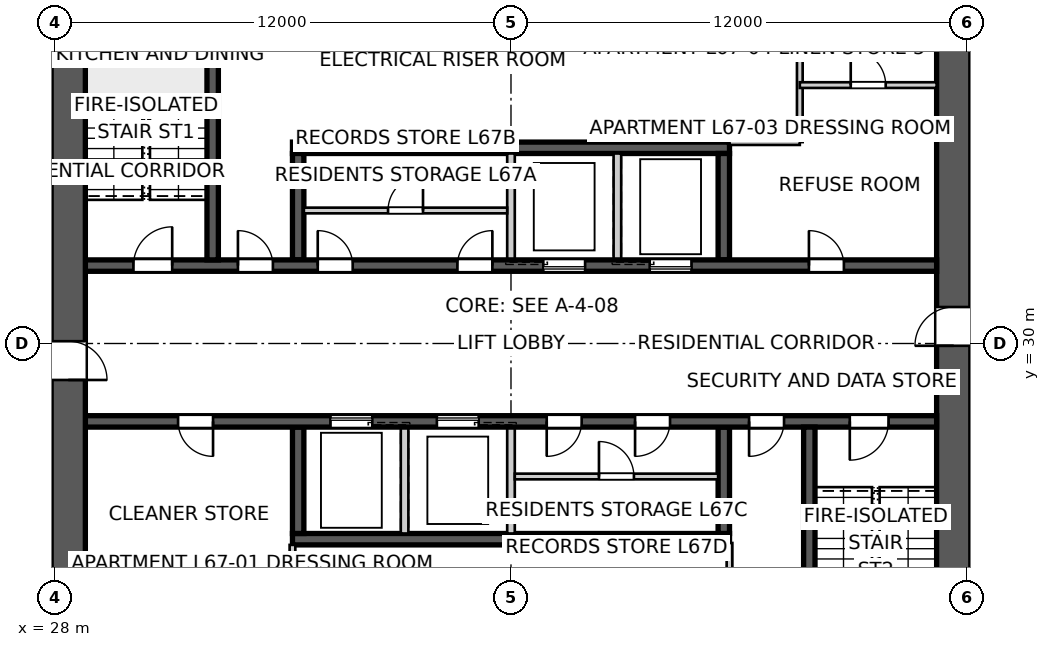
"""IFC4 building model, lengths in metres.
Left out: names, types, materials, properties, quantities, classifications, styles, units other than length and angle.
Written with IfcOpenShell. Run it as: python <this file> out.ifc"""

import sys

from ifc_helpers import new_model, si_unit, direction, frame, frame_2d, origin, place, context, subcontext, project, spatial, polyline, rectangle, outline, extrude, element, fill, save


model = new_model("IFC4")
c1 = context("Model", 3, precision=1e-05, world=origin(), true_north=direction((0.0, 1.0)))
c2 = subcontext(c1, "Body", "Model", "MODEL_VIEW")
j1 = project(units=[si_unit("LENGTHUNIT", "METRE"), si_unit("PLANEANGLEUNIT", "RADIAN")], contexts=[c1])
p1 = place(None, origin())
s1 = spatial("IfcSite", under=j1, at=p1, CompositionType="ELEMENT")
p2 = place(p1, origin())
s2 = spatial("IfcBuilding", under=s1, at=p2, CompositionType="ELEMENT")
p3 = place(p2, frame((0.0, 0.0, 243.8)))
s3 = spatial("IfcBuildingStorey", under=s2, at=p3, CompositionType="ELEMENT", Elevation=243.8)
p4 = place(p3, frame((51.65, 18.8, 0.0), z_axis=(0.0, 0.0, 1.0), x_axis=(0.0, 1.0, 0.0)))
e1 = element("IfcWall", 1, at=p4, inside=s3, PredefinedType="SHEAR", context=c2, shape_type="SweptSolid", body=[
    extrude(outline(polyline([(0.0, -0.45), (22.4, -0.45), (22.4, -0.025), (22.85, -0.025), (22.85, 0.025), (22.4, 0.025), (22.4, 0.45), (0.0, 0.45), (0.0, 0.025), (-0.45, 0.025), (-0.45, -0.025), (0.0, -0.025), (0.0, -0.45)])), origin(), (0.0, 0.0, 1.0), 3.4),
])
p5 = place(p4, frame((11.14, 0.0, 0.0)))
e2 = element("IfcOpeningElement", 2, at=p5, cuts=e1, PredefinedType="OPENING", context=c2, shape_type="SweptSolid", body=[
    extrude(rectangle(XDim=1.02, YDim=2.4, at=frame_2d((0.51, 1.2))), frame((0.0, 0.46, 0.0), z_axis=(0.0, -1.0, 0.0), x_axis=(1.0, 0.0, 0.0)), (0.0, 0.0, 1.0), 0.92),
])
p6 = place(p3, frame((28.35, 41.2, 0.0), z_axis=(0.0, 0.0, 1.0), x_axis=(0.0, -1.0, 0.0)))
e3 = element("IfcWall", 3, at=p6, inside=s3, PredefinedType="SHEAR", context=c2, shape_type="SweptSolid", body=[
    extrude(outline(polyline([(0.0, -0.45), (22.4, -0.45), (22.4, -0.025), (22.85, -0.025), (22.85, 0.025), (22.4, 0.025), (22.4, 0.45), (0.0, 0.45), (0.0, 0.025), (-0.45, 0.025), (-0.45, -0.025), (0.0, -0.025), (0.0, -0.45)])), origin(), (0.0, 0.0, 1.0), 3.4),
])
p7 = place(p6, frame((11.14, 0.0, 0.0)))
e4 = element("IfcOpeningElement", 4, at=p7, cuts=e3, PredefinedType="OPENING", context=c2, shape_type="SweptSolid", body=[
    extrude(rectangle(XDim=1.02, YDim=2.4, at=frame_2d((0.51, 1.2))), frame((0.0, 0.46, 0.0), z_axis=(0.0, -1.0, 0.0), x_axis=(1.0, 0.0, 0.0)), (0.0, 0.0, 1.0), 0.92),
])
p8 = place(p3, frame((28.8, 32.05, 0.0), z_axis=(0.0, 0.0, 1.0), x_axis=(1.0, 0.0, 0.0)))
e5 = element("IfcWall", 5, at=p8, inside=s3, PredefinedType="SHEAR", context=c2, shape_type="SweptSolid", body=[
    extrude(rectangle(XDim=22.4, YDim=0.3, at=frame_2d((11.2, 0.0))), origin(), (0.0, 0.0, 1.0), 3.4),
])
p9 = place(p8, frame((19.04, 0.0, 0.0)))
e6 = element("IfcOpeningElement", 6, at=p9, cuts=e5, PredefinedType="OPENING", context=c2, shape_type="SweptSolid", body=[
    extrude(rectangle(XDim=0.92, YDim=2.1, at=frame_2d((0.46, 1.05))), frame((0.0, 0.16, 0.0), z_axis=(0.0, -1.0, 0.0), x_axis=(1.0, 0.0, 0.0)), (0.0, 0.0, 1.0), 0.32),
])
p10 = place(p8, frame((1.265, 0.0, 0.0)))
e7 = element("IfcOpeningElement", 7, at=p10, cuts=e5, PredefinedType="OPENING", context=c2, shape_type="SweptSolid", body=[
    extrude(rectangle(XDim=1.02, YDim=2.1, at=frame_2d((0.51, 1.05))), frame((0.0, 0.16, 0.0), z_axis=(0.0, -1.0, 0.0), x_axis=(1.0, 0.0, 0.0)), (0.0, 0.0, 1.0), 0.32),
])
p11 = place(p8, frame((4.015, 0.0, 0.0)))
e8 = element("IfcOpeningElement", 8, at=p11, cuts=e5, PredefinedType="OPENING", context=c2, shape_type="SweptSolid", body=[
    extrude(rectangle(XDim=0.92, YDim=2.1, at=frame_2d((0.46, 1.05))), frame((0.0, 0.16, 0.0), z_axis=(0.0, -1.0, 0.0), x_axis=(1.0, 0.0, 0.0)), (0.0, 0.0, 1.0), 0.32),
])
p12 = place(p8, frame((6.115, 0.0, 0.0)))
e9 = element("IfcOpeningElement", 9, at=p12, cuts=e5, PredefinedType="OPENING", context=c2, shape_type="SweptSolid", body=[
    extrude(rectangle(XDim=0.92, YDim=2.1, at=frame_2d((0.46, 1.05))), frame((0.0, 0.16, 0.0), z_axis=(0.0, -1.0, 0.0), x_axis=(1.0, 0.0, 0.0)), (0.0, 0.0, 1.0), 0.32),
])
p13 = place(p8, frame((9.79, 0.0, 0.0)))
e10 = element("IfcOpeningElement", 10, at=p13, cuts=e5, PredefinedType="OPENING", context=c2, shape_type="SweptSolid", body=[
    extrude(rectangle(XDim=0.92, YDim=2.1, at=frame_2d((0.46, 1.05))), frame((0.0, 0.16, 0.0), z_axis=(0.0, -1.0, 0.0), x_axis=(1.0, 0.0, 0.0)), (0.0, 0.0, 1.0), 0.32),
])
p14 = place(p8, frame((12.05, 0.0, 0.0)))
e11 = element("IfcOpeningElement", 11, at=p14, cuts=e5, PredefinedType="OPENING", context=c2, shape_type="SweptSolid", body=[
    extrude(rectangle(XDim=1.1, YDim=2.1, at=frame_2d((0.55, 1.05))), frame((0.0, 0.16, 0.0), z_axis=(0.0, -1.0, 0.0), x_axis=(1.0, 0.0, 0.0)), (0.0, 0.0, 1.0), 0.32),
])
p15 = place(p8, frame((14.85, 0.0, 0.0)))
e12 = element("IfcOpeningElement", 12, at=p15, cuts=e5, PredefinedType="OPENING", context=c2, shape_type="SweptSolid", body=[
    extrude(rectangle(XDim=1.1, YDim=2.1, at=frame_2d((0.55, 1.05))), frame((0.0, 0.16, 0.0), z_axis=(0.0, -1.0, 0.0), x_axis=(1.0, 0.0, 0.0)), (0.0, 0.0, 1.0), 0.32),
])
p16 = place(p3, frame((51.2, 27.95, 0.0), z_axis=(0.0, 0.0, 1.0), x_axis=(-1.0, 0.0, 0.0)))
e13 = element("IfcWall", 13, at=p16, inside=s3, PredefinedType="SHEAR", context=c2, shape_type="SweptSolid", body=[
    extrude(rectangle(XDim=22.4, YDim=0.3, at=frame_2d((11.2, 0.0))), origin(), (0.0, 0.0, 1.0), 3.4),
])
p17 = place(p16, frame((19.04, 0.0, 0.0)))
e14 = element("IfcOpeningElement", 14, at=p17, cuts=e13, PredefinedType="OPENING", context=c2, shape_type="SweptSolid", body=[
    extrude(rectangle(XDim=0.92, YDim=2.1, at=frame_2d((0.46, 1.05))), frame((0.0, 0.16, 0.0), z_axis=(0.0, -1.0, 0.0), x_axis=(1.0, 0.0, 0.0)), (0.0, 0.0, 1.0), 0.32),
])
p18 = place(p16, frame((1.265, 0.0, 0.0)))
e15 = element("IfcOpeningElement", 15, at=p18, cuts=e13, PredefinedType="OPENING", context=c2, shape_type="SweptSolid", body=[
    extrude(rectangle(XDim=1.02, YDim=2.1, at=frame_2d((0.51, 1.05))), frame((0.0, 0.16, 0.0), z_axis=(0.0, -1.0, 0.0), x_axis=(1.0, 0.0, 0.0)), (0.0, 0.0, 1.0), 0.32),
])
p19 = place(p16, frame((4.015, 0.0, 0.0)))
e16 = element("IfcOpeningElement", 16, at=p19, cuts=e13, PredefinedType="OPENING", context=c2, shape_type="SweptSolid", body=[
    extrude(rectangle(XDim=0.92, YDim=2.1, at=frame_2d((0.46, 1.05))), frame((0.0, 0.16, 0.0), z_axis=(0.0, -1.0, 0.0), x_axis=(1.0, 0.0, 0.0)), (0.0, 0.0, 1.0), 0.32),
])
p20 = place(p16, frame((9.34, 0.0, 0.0)))
e17 = element("IfcOpeningElement", 17, at=p20, cuts=e13, PredefinedType="OPENING", context=c2, shape_type="SweptSolid", body=[
    extrude(rectangle(XDim=0.92, YDim=2.1, at=frame_2d((0.46, 1.05))), frame((0.0, 0.16, 0.0), z_axis=(0.0, -1.0, 0.0), x_axis=(1.0, 0.0, 0.0)), (0.0, 0.0, 1.0), 0.32),
])
p21 = place(p16, frame((7.015, 0.0, 0.0)))
e18 = element("IfcOpeningElement", 18, at=p21, cuts=e13, PredefinedType="OPENING", context=c2, shape_type="SweptSolid", body=[
    extrude(rectangle(XDim=0.92, YDim=2.1, at=frame_2d((0.46, 1.05))), frame((0.0, 0.16, 0.0), z_axis=(0.0, -1.0, 0.0), x_axis=(1.0, 0.0, 0.0)), (0.0, 0.0, 1.0), 0.32),
])
p22 = place(p16, frame((12.05, 0.0, 0.0)))
e19 = element("IfcOpeningElement", 19, at=p22, cuts=e13, PredefinedType="OPENING", context=c2, shape_type="SweptSolid", body=[
    extrude(rectangle(XDim=1.1, YDim=2.1, at=frame_2d((0.55, 1.05))), frame((0.0, 0.16, 0.0), z_axis=(0.0, -1.0, 0.0), x_axis=(1.0, 0.0, 0.0)), (0.0, 0.0, 1.0), 0.32),
])
p23 = place(p16, frame((14.85, 0.0, 0.0)))
e20 = element("IfcOpeningElement", 20, at=p23, cuts=e13, PredefinedType="OPENING", context=c2, shape_type="SweptSolid", body=[
    extrude(rectangle(XDim=1.1, YDim=2.1, at=frame_2d((0.55, 1.05))), frame((0.0, 0.16, 0.0), z_axis=(0.0, -1.0, 0.0), x_axis=(1.0, 0.0, 0.0)), (0.0, 0.0, 1.0), 0.32),
])
for number, where, z_axis, x_axis in (
    (21, (34.25, 35.15, 0.0), (0.0, 0.0, 1.0), (1.0, 0.0, 0.0)),
    (22, (45.75, 24.85, 0.0), (0.0, 0.0, 1.0), (-1.0, 0.0, 0.0)),
):
    element("IfcWall", number, at=place(p3, frame(where, z_axis=z_axis, x_axis=x_axis)), inside=s3, PredefinedType="SHEAR", context=c2, shape_type="SweptSolid", body=[
        extrude(rectangle(XDim=11.5, YDim=0.3, at=frame_2d((5.75, 0.0))), origin(), (0.0, 0.0, 1.0), 3.4),
    ])
for number, where, z_axis, x_axis in (
    (23, (34.4, 32.2, 0.0), (0.0, 0.0, 1.0), (0.0, 1.0, 0.0)),
    (24, (45.6, 27.8, 0.0), (0.0, 0.0, 1.0), (0.0, -1.0, 0.0)),
):
    element("IfcWall", number, at=place(p3, frame(where, z_axis=z_axis, x_axis=x_axis)), inside=s3, PredefinedType="SHEAR", context=c2, shape_type="SweptSolid", body=[
        extrude(rectangle(XDim=2.8, YDim=0.3, at=frame_2d((1.4, 0.0))), origin(), (0.0, 0.0, 1.0), 3.4),
    ])
for number, where, z_axis, x_axis in (
    (25, (40.0, 32.2, 0.0), (0.0, 0.0, 1.0), (0.0, 1.0, 0.0)),
    (26, (40.0, 27.8, 0.0), (0.0, 0.0, 1.0), (0.0, -1.0, 0.0)),
    (27, (42.8, 32.2, 0.0), (0.0, 0.0, 1.0), (0.0, 1.0, 0.0)),
    (28, (37.2, 27.8, 0.0), (0.0, 0.0, 1.0), (0.0, -1.0, 0.0)),
):
    element("IfcWall", number, at=place(p3, frame(where, z_axis=z_axis, x_axis=x_axis)), inside=s3, PredefinedType="SOLIDWALL", context=c2, shape_type="SweptSolid", body=[
        extrude(rectangle(XDim=2.8, YDim=0.2, at=frame_2d((1.4, 0.0))), origin(), (0.0, 0.0, 1.0), 3.4),
    ])
for number, where, z_axis, x_axis in (
    (29, (45.6, 32.2, 0.0), (0.0, 0.0, 1.0), (0.0, 1.0, 0.0)),
    (30, (34.4, 27.8, 0.0), (0.0, 0.0, 1.0), (0.0, -1.0, 0.0)),
):
    element("IfcWall", number, at=place(p3, frame(where, z_axis=z_axis, x_axis=x_axis)), inside=s3, PredefinedType="SHEAR", context=c2, shape_type="SweptSolid", body=[
        extrude(rectangle(XDim=2.8, YDim=0.3, at=frame_2d((1.4, 0.0))), origin(), (0.0, 0.0, 1.0), 3.4),
    ])
for number, where, z_axis, x_axis in (
    (31, (32.15, 32.2, 0.0), (0.0, 0.0, 1.0), (0.0, 1.0, 0.0)),
    (32, (47.85, 27.8, 0.0), (0.0, 0.0, 1.0), (0.0, -1.0, 0.0)),
):
    element("IfcWall", number, at=place(p3, frame(where, z_axis=z_axis, x_axis=x_axis)), inside=s3, PredefinedType="SHEAR", context=c2, shape_type="SweptSolid", body=[
        extrude(rectangle(XDim=7.7, YDim=0.3, at=frame_2d((3.85, 0.0))), origin(), (0.0, 0.0, 1.0), 3.4),
    ])
for number, where, z_axis, x_axis in (
    (33, (38.9, 37.6, 0.0), (0.0, 0.0, 1.0), (0.0, 1.0, 0.0)),
    (34, (41.1, 37.6, 0.0), (0.0, 0.0, 1.0), (0.0, 1.0, 0.0)),
):
    element("IfcWall", number, at=place(p3, frame(where, z_axis=z_axis, x_axis=x_axis)), inside=s3, PredefinedType="SOLIDWALL", context=c2, shape_type="SweptSolid", body=[
        extrude(rectangle(XDim=2.0, YDim=0.2, at=frame_2d((1.0, 0.0))), origin(), (0.0, 0.0, 1.0), 3.4),
    ])
p24 = place(p3, frame((38.8, 37.5, 0.0), z_axis=(0.0, 0.0, 1.0), x_axis=(1.0, 0.0, 0.0)))
e35 = element("IfcWall", 35, at=p24, inside=s3, PredefinedType="SOLIDWALL", context=c2, shape_type="SweptSolid", body=[
    extrude(rectangle(XDim=2.4, YDim=0.2, at=frame_2d((1.2, 0.0))), origin(), (0.0, 0.0, 1.0), 3.4),
])
p25 = place(p3, frame((47.6, 41.2, 0.0), z_axis=(0.0, 0.0, 1.0), x_axis=(0.0, -1.0, 0.0)))
e36 = element("IfcWall", 36, at=p25, inside=s3, PredefinedType="SOLIDWALL", context=c2, shape_type="SweptSolid", body=[
    extrude(rectangle(XDim=5.9, YDim=0.15, at=frame_2d((2.95, 0.0))), origin(), (0.0, 0.0, 1.0), 3.25),
])
p26 = place(p3, frame((47.6, 35.3, 0.0), z_axis=(0.0, 0.0, 1.0), x_axis=(-1.0, 0.0, 0.0)))
e37 = element("IfcWall", 37, at=p26, inside=s3, PredefinedType="SOLIDWALL", context=c2, shape_type="SweptSolid", body=[
    extrude(rectangle(XDim=1.85, YDim=0.15, at=frame_2d((0.925, 0.0))), origin(), (0.0, 0.0, 1.0), 3.25),
])
p27 = place(p3, frame((47.6, 36.8, 0.0), z_axis=(0.0, 0.0, 1.0), x_axis=(1.0, 0.0, 0.0)))
e38 = element("IfcWall", 38, at=p27, inside=s3, PredefinedType="SOLIDWALL", context=c2, shape_type="SweptSolid", body=[
    extrude(rectangle(XDim=3.6, YDim=0.15, at=frame_2d((1.8, 0.0))), origin(), (0.0, 0.0, 1.0), 3.25),
])
p28 = place(p27, frame((1.34, 0.0, 0.0)))
e39 = element("IfcOpeningElement", 39, at=p28, cuts=e38, PredefinedType="OPENING", context=c2, shape_type="SweptSolid", body=[
    extrude(rectangle(XDim=0.92, YDim=2.1, at=frame_2d((0.46, 1.05))), frame((0.0, 0.085, 0.0), z_axis=(0.0, -1.0, 0.0), x_axis=(1.0, 0.0, 0.0)), (0.0, 0.0, 1.0), 0.17),
])
p29 = place(p3, frame((45.75, 18.8, 0.0), z_axis=(0.0, 0.0, 1.0), x_axis=(0.0, 1.0, 0.0)))
e40 = element("IfcWall", 40, at=p29, inside=s3, PredefinedType="SOLIDWALL", context=c2, shape_type="SweptSolid", body=[
    extrude(rectangle(XDim=5.95, YDim=0.15, at=frame_2d((2.975, 0.0))), origin(), (0.0, 0.0, 1.0), 3.25),
])
p30 = place(p29, frame((2.515, 0.0, 0.0)))
e41 = element("IfcOpeningElement", 41, at=p30, cuts=e40, PredefinedType="OPENING", context=c2, shape_type="SweptSolid", body=[
    extrude(rectangle(XDim=0.92, YDim=2.1, at=frame_2d((0.46, 1.05))), frame((0.0, 0.085, 0.0), z_axis=(0.0, -1.0, 0.0), x_axis=(1.0, 0.0, 0.0)), (0.0, 0.0, 1.0), 0.17),
])
p31 = place(p3, frame((34.25, 18.8, 0.0), z_axis=(0.0, 0.0, 1.0), x_axis=(0.0, 1.0, 0.0)))
e42 = element("IfcWall", 42, at=p31, inside=s3, PredefinedType="SOLIDWALL", context=c2, shape_type="SweptSolid", body=[
    extrude(rectangle(XDim=5.9, YDim=0.15, at=frame_2d((2.95, 0.0))), origin(), (0.0, 0.0, 1.0), 3.25),
])
p32 = place(p3, frame((34.55, 33.5, 0.0), z_axis=(0.0, 0.0, 1.0), x_axis=(1.0, 0.0, 0.0)))
e43 = element("IfcWall", 43, at=p32, inside=s3, PredefinedType="SOLIDWALL", context=c2, shape_type="SweptSolid", body=[
    extrude(rectangle(XDim=5.35, YDim=0.15, at=frame_2d((2.675, 0.0))), origin(), (0.0, 0.0, 1.0), 3.25),
])
p33 = place(p32, frame((2.215, 0.0, 0.0)))
e44 = element("IfcOpeningElement", 44, at=p33, cuts=e43, PredefinedType="OPENING", context=c2, shape_type="SweptSolid", body=[
    extrude(rectangle(XDim=0.92, YDim=2.1, at=frame_2d((0.46, 1.05))), frame((0.0, 0.085, 0.0), z_axis=(0.0, -1.0, 0.0), x_axis=(1.0, 0.0, 0.0)), (0.0, 0.0, 1.0), 0.17),
])
p34 = place(p3, frame((40.1, 26.5, 0.0), z_axis=(0.0, 0.0, 1.0), x_axis=(1.0, 0.0, 0.0)))
e45 = element("IfcWall", 45, at=p34, inside=s3, PredefinedType="SOLIDWALL", context=c2, shape_type="SweptSolid", body=[
    extrude(rectangle(XDim=5.35, YDim=0.15, at=frame_2d((2.675, 0.0))), origin(), (0.0, 0.0, 1.0), 3.25),
])
p35 = place(p34, frame((2.215, 0.0, 0.0)))
e46 = element("IfcOpeningElement", 46, at=p35, cuts=e45, PredefinedType="OPENING", context=c2, shape_type="SweptSolid", body=[
    extrude(rectangle(XDim=0.92, YDim=2.1, at=frame_2d((0.46, 1.05))), frame((0.0, 0.085, 0.0), z_axis=(0.0, -1.0, 0.0), x_axis=(1.0, 0.0, 0.0)), (0.0, 0.0, 1.0), 0.17),
])
p36 = place(p9, origin())
e47 = element("IfcDoor", 47, at=p36, inside=s3, OperationType="SINGLE_SWING_LEFT", PredefinedType="DOOR", context=c2, shape_type="SweptSolid", body=[
    extrude(rectangle(XDim=0.92, YDim=2.1, at=frame_2d((0.46, 1.05))), frame((0.0, 0.025, 0.0), z_axis=(0.0, -1.0, 0.0), x_axis=(1.0, 0.0, 0.0)), (0.0, 0.0, 1.0), 0.05),
])
fill(e6, e47)
p37 = place(p17, origin())
e48 = element("IfcDoor", 48, at=p37, inside=s3, OperationType="SINGLE_SWING_LEFT", PredefinedType="DOOR", context=c2, shape_type="SweptSolid", body=[
    extrude(rectangle(XDim=0.92, YDim=2.1, at=frame_2d((0.46, 1.05))), frame((0.0, 0.025, 0.0), z_axis=(0.0, -1.0, 0.0), x_axis=(1.0, 0.0, 0.0)), (0.0, 0.0, 1.0), 0.05),
])
fill(e14, e48)
p38 = place(p18, origin())
e49 = element("IfcDoor", 49, at=p38, inside=s3, OperationType="SINGLE_SWING_RIGHT", PredefinedType="DOOR", context=c2, shape_type="SweptSolid", body=[
    extrude(rectangle(XDim=1.02, YDim=2.1, at=frame_2d((0.51, 1.05))), frame((0.0, 0.025, 0.0), z_axis=(0.0, -1.0, 0.0), x_axis=(1.0, 0.0, 0.0)), (0.0, 0.0, 1.0), 0.05),
])
fill(e15, e49)
p39 = place(p10, origin())
e50 = element("IfcDoor", 50, at=p39, inside=s3, OperationType="SINGLE_SWING_RIGHT", PredefinedType="DOOR", context=c2, shape_type="SweptSolid", body=[
    extrude(rectangle(XDim=1.02, YDim=2.1, at=frame_2d((0.51, 1.05))), frame((0.0, 0.025, 0.0), z_axis=(0.0, -1.0, 0.0), x_axis=(1.0, 0.0, 0.0)), (0.0, 0.0, 1.0), 0.05),
])
fill(e7, e50)
p40 = place(p11, origin())
e51 = element("IfcDoor", 51, at=p40, inside=s3, OperationType="SINGLE_SWING_LEFT", PredefinedType="DOOR", context=c2, shape_type="SweptSolid", body=[
    extrude(rectangle(XDim=0.92, YDim=2.1, at=frame_2d((0.46, 1.05))), frame((0.0, 0.025, 0.0), z_axis=(0.0, -1.0, 0.0), x_axis=(1.0, 0.0, 0.0)), (0.0, 0.0, 1.0), 0.05),
])
fill(e8, e51)
p41 = place(p19, origin())
e52 = element("IfcDoor", 52, at=p41, inside=s3, OperationType="SINGLE_SWING_RIGHT", PredefinedType="DOOR", context=c2, shape_type="SweptSolid", body=[
    extrude(rectangle(XDim=0.92, YDim=2.1, at=frame_2d((0.46, 1.05))), frame((0.0, 0.025, 0.0), z_axis=(0.0, -1.0, 0.0), x_axis=(1.0, 0.0, 0.0)), (0.0, 0.0, 1.0), 0.05),
])
fill(e16, e52)
p42 = place(p28, origin())
e53 = element("IfcDoor", 53, at=p42, inside=s3, OperationType="SINGLE_SWING_LEFT", PredefinedType="DOOR", context=c2, shape_type="SweptSolid", body=[
    extrude(rectangle(XDim=0.92, YDim=2.1, at=frame_2d((0.46, 1.05))), frame((0.0, 0.025, 0.0), z_axis=(0.0, -1.0, 0.0), x_axis=(1.0, 0.0, 0.0)), (0.0, 0.0, 1.0), 0.05),
])
fill(e39, e53)
p43 = place(p12, origin())
e54 = element("IfcDoor", 54, at=p43, inside=s3, OperationType="SINGLE_SWING_LEFT", PredefinedType="DOOR", context=c2, shape_type="SweptSolid", body=[
    extrude(rectangle(XDim=0.92, YDim=2.1, at=frame_2d((0.46, 1.05))), frame((0.0, 0.025, 0.0), z_axis=(0.0, -1.0, 0.0), x_axis=(1.0, 0.0, 0.0)), (0.0, 0.0, 1.0), 0.05),
])
fill(e9, e54)
p44 = place(p13, origin())
e55 = element("IfcDoor", 55, at=p44, inside=s3, OperationType="SINGLE_SWING_RIGHT", PredefinedType="DOOR", context=c2, shape_type="SweptSolid", body=[
    extrude(rectangle(XDim=0.92, YDim=2.1, at=frame_2d((0.46, 1.05))), frame((0.0, 0.025, 0.0), z_axis=(0.0, -1.0, 0.0), x_axis=(1.0, 0.0, 0.0)), (0.0, 0.0, 1.0), 0.05),
])
fill(e10, e55)
p45 = place(p33, origin())
e56 = element("IfcDoor", 56, at=p45, inside=s3, OperationType="SINGLE_SWING_RIGHT", PredefinedType="DOOR", context=c2, shape_type="SweptSolid", body=[
    extrude(rectangle(XDim=0.92, YDim=2.1, at=frame_2d((0.46, 1.05))), frame((0.0, 0.025, 0.0), z_axis=(0.0, -1.0, 0.0), x_axis=(1.0, 0.0, 0.0)), (0.0, 0.0, 1.0), 0.05),
])
fill(e44, e56)
p46 = place(p20, origin())
e57 = element("IfcDoor", 57, at=p46, inside=s3, OperationType="SINGLE_SWING_RIGHT", PredefinedType="DOOR", context=c2, shape_type="SweptSolid", body=[
    extrude(rectangle(XDim=0.92, YDim=2.1, at=frame_2d((0.46, 1.05))), frame((0.0, 0.025, 0.0), z_axis=(0.0, -1.0, 0.0), x_axis=(1.0, 0.0, 0.0)), (0.0, 0.0, 1.0), 0.05),
])
fill(e17, e57)
p47 = place(p21, origin())
e58 = element("IfcDoor", 58, at=p47, inside=s3, OperationType="SINGLE_SWING_RIGHT", PredefinedType="DOOR", context=c2, shape_type="SweptSolid", body=[
    extrude(rectangle(XDim=0.92, YDim=2.1, at=frame_2d((0.46, 1.05))), frame((0.0, 0.025, 0.0), z_axis=(0.0, -1.0, 0.0), x_axis=(1.0, 0.0, 0.0)), (0.0, 0.0, 1.0), 0.05),
])
fill(e18, e58)
p48 = place(p35, origin())
e59 = element("IfcDoor", 59, at=p48, inside=s3, OperationType="SINGLE_SWING_LEFT", PredefinedType="DOOR", context=c2, shape_type="SweptSolid", body=[
    extrude(rectangle(XDim=0.92, YDim=2.1, at=frame_2d((0.46, 1.05))), frame((0.0, 0.025, 0.0), z_axis=(0.0, -1.0, 0.0), x_axis=(1.0, 0.0, 0.0)), (0.0, 0.0, 1.0), 0.05),
])
fill(e46, e59)
p49 = place(p5, origin())
e60 = element("IfcDoor", 60, at=p49, inside=s3, OperationType="SINGLE_SWING_LEFT", PredefinedType="DOOR", context=c2, shape_type="SweptSolid", body=[
    extrude(rectangle(XDim=1.02, YDim=2.4, at=frame_2d((0.51, 1.2))), frame((0.0, 0.025, 0.0), z_axis=(0.0, -1.0, 0.0), x_axis=(1.0, 0.0, 0.0)), (0.0, 0.0, 1.0), 0.05),
])
fill(e2, e60)
p50 = place(p7, origin())
e61 = element("IfcDoor", 61, at=p50, inside=s3, OperationType="SINGLE_SWING_RIGHT", PredefinedType="DOOR", context=c2, shape_type="SweptSolid", body=[
    extrude(rectangle(XDim=1.02, YDim=2.4, at=frame_2d((0.51, 1.2))), frame((0.0, 0.025, 0.0), z_axis=(0.0, -1.0, 0.0), x_axis=(1.0, 0.0, 0.0)), (0.0, 0.0, 1.0), 0.05),
])
fill(e4, e61)
p51 = place(p14, origin())
e62 = element("IfcDoor", 62, at=p51, inside=s3, OperationType="SLIDING_TO_LEFT", PredefinedType="DOOR", context=c2, shape_type="SweptSolid", body=[
    extrude(rectangle(XDim=1.1, YDim=2.1, at=frame_2d((0.55, 1.05))), frame((0.0, 0.025, 0.0), z_axis=(0.0, -1.0, 0.0), x_axis=(1.0, 0.0, 0.0)), (0.0, 0.0, 1.0), 0.05),
])
fill(e11, e62)
p52 = place(p22, origin())
e63 = element("IfcDoor", 63, at=p52, inside=s3, OperationType="SLIDING_TO_LEFT", PredefinedType="DOOR", context=c2, shape_type="SweptSolid", body=[
    extrude(rectangle(XDim=1.1, YDim=2.1, at=frame_2d((0.55, 1.05))), frame((0.0, 0.025, 0.0), z_axis=(0.0, -1.0, 0.0), x_axis=(1.0, 0.0, 0.0)), (0.0, 0.0, 1.0), 0.05),
])
fill(e19, e63)
p53 = place(p15, origin())
e64 = element("IfcDoor", 64, at=p53, inside=s3, OperationType="SLIDING_TO_LEFT", PredefinedType="DOOR", context=c2, shape_type="SweptSolid", body=[
    extrude(rectangle(XDim=1.1, YDim=2.1, at=frame_2d((0.55, 1.05))), frame((0.0, 0.025, 0.0), z_axis=(0.0, -1.0, 0.0), x_axis=(1.0, 0.0, 0.0)), (0.0, 0.0, 1.0), 0.05),
])
fill(e12, e64)
p54 = place(p23, origin())
e65 = element("IfcDoor", 65, at=p54, inside=s3, OperationType="SLIDING_TO_LEFT", PredefinedType="DOOR", context=c2, shape_type="SweptSolid", body=[
    extrude(rectangle(XDim=1.1, YDim=2.1, at=frame_2d((0.55, 1.05))), frame((0.0, 0.025, 0.0), z_axis=(0.0, -1.0, 0.0), x_axis=(1.0, 0.0, 0.0)), (0.0, 0.0, 1.0), 0.05),
])
fill(e20, e65)
save(model, sys.argv[1])
